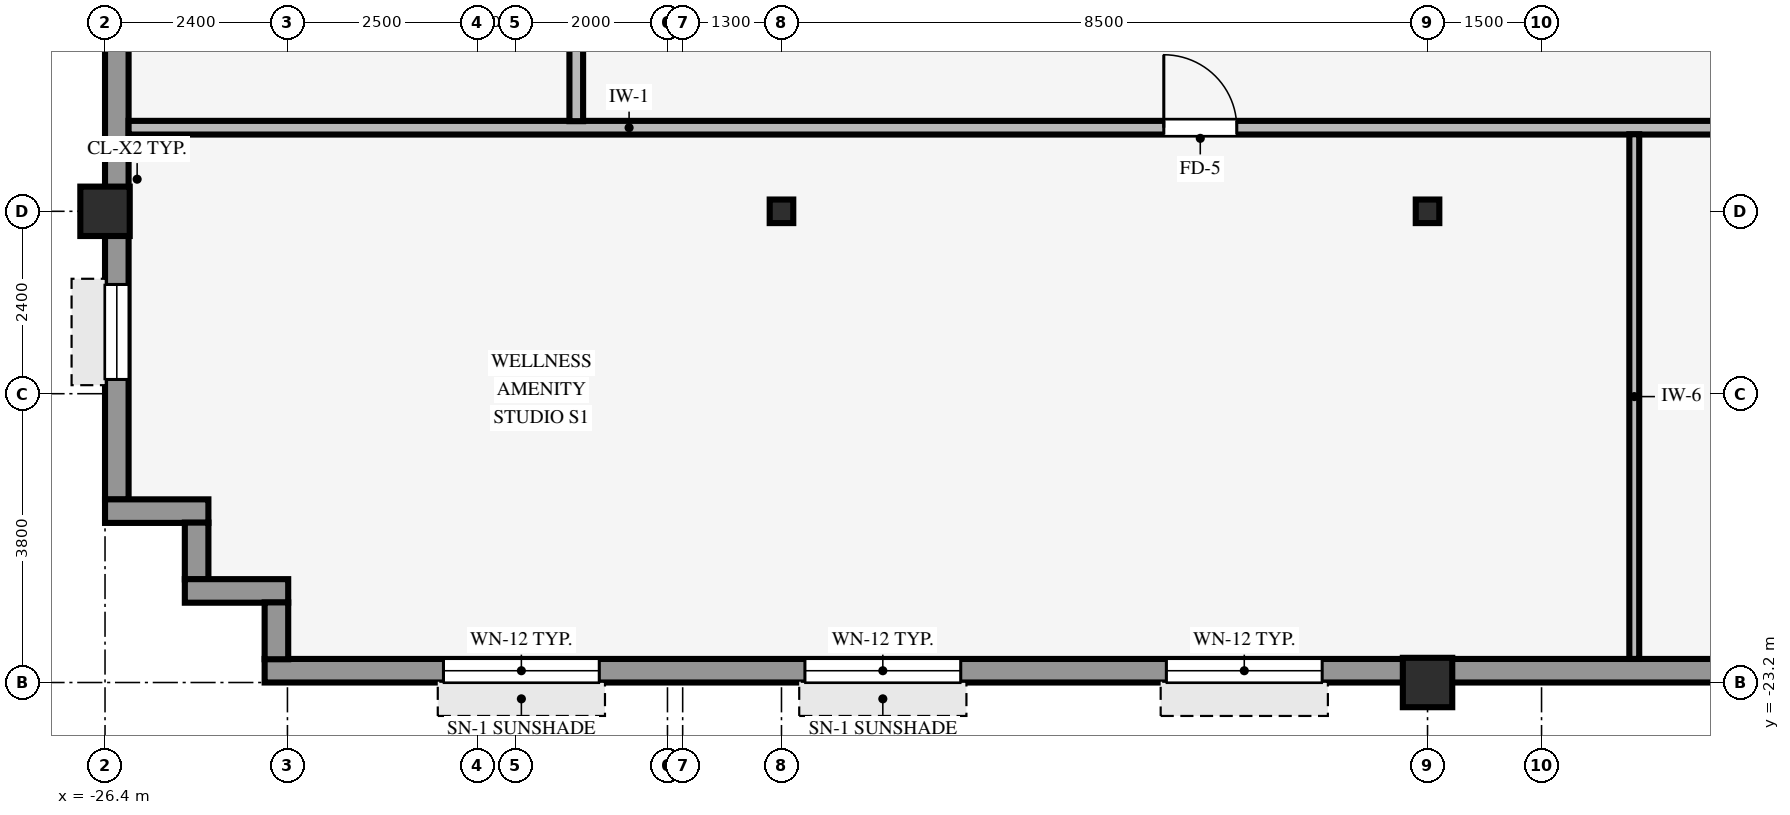
"""IFC4 building model, lengths in metres.
Left out: names, types, materials, properties, quantities, classifications, styles, units other than length and angle.
Written with IfcOpenShell. Run it as: python <this file> out.ifc"""

import sys

from ifc_helpers import new_model, si_unit, direction, frame, frame_2d, origin, origin_2d, place, context, subcontext, project, spatial, rectangle, hollow_rectangle, i_section, extrude, source, transform, mapped, element, fill, save


model = new_model("IFC4")
c1 = context("Model", 3, precision=1e-05, world=origin(), true_north=direction((0.0, 1.0)))
c2 = subcontext(c1, "Body", "Model", "MODEL_VIEW")
j1 = project(units=[si_unit("LENGTHUNIT", "METRE"), si_unit("PLANEANGLEUNIT", "RADIAN")], contexts=[c1])
p1 = place(None, origin())
s1 = spatial("IfcSite", under=j1, at=p1, CompositionType="ELEMENT")
p2 = place(p1, origin())
s2 = spatial("IfcBuilding", under=s1, at=p2, CompositionType="ELEMENT")
p3 = place(p2, frame((0.0, 0.0, 174.95)))
s3 = spatial("IfcBuildingStorey", under=s2, at=p3, CompositionType="ELEMENT", Elevation=174.95)
for number, where, z_axis, x_axis in (
    (1, (-26.4, -17.0, 0.0), (0.0, 0.0, 1.0), (1.0, 0.0, 0.0)),
    (2, (-9.0, -23.2, 0.0), (0.0, 0.0, 1.0), (1.0, 0.0, 0.0)),
):
    element("IfcColumn", number, at=place(p3, frame(where, z_axis=z_axis, x_axis=x_axis)), inside=s3, PredefinedType="COLUMN", context=c2, shape_type="SweptSolid", body=[
        extrude(hollow_rectangle(XDim=0.65, YDim=0.65, WallThickness=0.04, InnerFilletRadius=0.04, OuterFilletRadius=0.08, at=origin_2d()), origin(), (0.0, 0.0, 1.0), 3.37),
    ])
for number, where, z_axis, x_axis in (
    (3, (-17.5, -17.0, 0.0), (0.0, 0.0, 1.0), (1.0, 0.0, 0.0)),
    (4, (-9.0, -17.0, 0.0), (0.0, 0.0, 1.0), (1.0, 0.0, 0.0)),
):
    element("IfcColumn", number, at=place(p3, frame(where, z_axis=z_axis, x_axis=x_axis)), inside=s3, PredefinedType="COLUMN", context=c2, shape_type="SweptSolid", body=[
        extrude(i_section(OverallWidth=0.31, OverallDepth=0.31, WebThickness=0.015, FlangeThickness=0.015, FilletRadius=0.015, at=origin_2d()), origin(), (0.0, 0.0, 1.0), 3.37),
    ])
p4 = place(p3, frame((-24.3, -23.045, 0.0), z_axis=(0.0, 0.0, 1.0), x_axis=(1.0, 0.0, 0.0)))
e5 = element("IfcWall", 5, at=p4, inside=s3, PredefinedType="STANDARD", context=c2, shape_type="SweptSolid", body=[
    extrude(rectangle(XDim=44.8, YDim=0.31, at=frame_2d((22.4, 0.0))), origin(), (0.0, 0.0, 1.0), 2.705),
])
p5 = place(p4, frame((2.353, 0.0, 0.8)))
e6 = element("IfcOpeningElement", 6, at=p5, cuts=e5, PredefinedType="OPENING", context=c2, shape_type="SweptSolid", body=[
    extrude(rectangle(XDim=2.05, YDim=1.52, at=frame_2d((1.025, 0.76))), frame((0.0, 0.165, 0.0), z_axis=(0.0, -1.0, 0.0), x_axis=(1.0, 0.0, 0.0)), (0.0, 0.0, 1.0), 0.33),
])
p6 = place(p4, frame((7.108, 0.0, 0.8)))
e7 = element("IfcOpeningElement", 7, at=p6, cuts=e5, PredefinedType="OPENING", context=c2, shape_type="SweptSolid", body=[
    extrude(rectangle(XDim=2.05, YDim=1.52, at=frame_2d((1.025, 0.76))), frame((0.0, 0.165, 0.0), z_axis=(0.0, -1.0, 0.0), x_axis=(1.0, 0.0, 0.0)), (0.0, 0.0, 1.0), 0.33),
])
p7 = place(p4, frame((11.864, 0.0, 0.8)))
e8 = element("IfcOpeningElement", 8, at=p7, cuts=e5, PredefinedType="OPENING", context=c2, shape_type="SweptSolid", body=[
    extrude(rectangle(XDim=2.05, YDim=1.52, at=frame_2d((1.025, 0.76))), frame((0.0, 0.165, 0.0), z_axis=(0.0, -1.0, 0.0), x_axis=(1.0, 0.0, 0.0)), (0.0, 0.0, 1.0), 0.33),
])
p8 = place(p4, frame((21.375, 0.0, 0.8)))
e9 = element("IfcOpeningElement", 9, at=p8, cuts=e5, PredefinedType="OPENING", context=c2, shape_type="SweptSolid", body=[
    extrude(rectangle(XDim=2.05, YDim=1.52, at=frame_2d((1.025, 0.76))), frame((0.0, 0.165, 0.0), z_axis=(0.0, -1.0, 0.0), x_axis=(1.0, 0.0, 0.0)), (0.0, 0.0, 1.0), 0.33),
])
p9 = place(p4, frame((26.131, 0.0, 0.8)))
e10 = element("IfcOpeningElement", 10, at=p9, cuts=e5, PredefinedType="OPENING", context=c2, shape_type="SweptSolid", body=[
    extrude(rectangle(XDim=2.05, YDim=1.52, at=frame_2d((1.025, 0.76))), frame((0.0, 0.165, 0.0), z_axis=(0.0, -1.0, 0.0), x_axis=(1.0, 0.0, 0.0)), (0.0, 0.0, 1.0), 0.33),
])
p10 = place(p4, frame((29.986, 0.0, 0.8)))
e11 = element("IfcOpeningElement", 11, at=p10, cuts=e5, PredefinedType="OPENING", context=c2, shape_type="SweptSolid", body=[
    extrude(rectangle(XDim=2.05, YDim=1.52, at=frame_2d((1.025, 0.76))), frame((0.0, 0.165, 0.0), z_axis=(0.0, -1.0, 0.0), x_axis=(1.0, 0.0, 0.0)), (0.0, 0.0, 1.0), 0.33),
])
p11 = place(p4, frame((35.642, 0.0, 0.8)))
e12 = element("IfcOpeningElement", 12, at=p11, cuts=e5, PredefinedType="OPENING", context=c2, shape_type="SweptSolid", body=[
    extrude(rectangle(XDim=2.05, YDim=1.52, at=frame_2d((1.025, 0.76))), frame((0.0, 0.165, 0.0), z_axis=(0.0, -1.0, 0.0), x_axis=(1.0, 0.0, 0.0)), (0.0, 0.0, 1.0), 0.33),
])
p12 = place(p4, frame((40.397, 0.0, 0.8)))
e13 = element("IfcOpeningElement", 13, at=p12, cuts=e5, PredefinedType="OPENING", context=c2, shape_type="SweptSolid", body=[
    extrude(rectangle(XDim=2.05, YDim=1.52, at=frame_2d((1.025, 0.76))), frame((0.0, 0.165, 0.0), z_axis=(0.0, -1.0, 0.0), x_axis=(1.0, 0.0, 0.0)), (0.0, 0.0, 1.0), 0.33),
])
p13 = place(p3, frame((-26.245, -20.794, 0.0), z_axis=(0.0, 0.0, 1.0), x_axis=(0.0, 1.0, 0.0)))
e14 = element("IfcWall", 14, at=p13, inside=s3, PredefinedType="STANDARD", context=c2, shape_type="SweptSolid", body=[
    extrude(rectangle(XDim=37.788, YDim=0.31, at=frame_2d((18.894, 0.0))), origin(), (0.0, 0.0, 1.0), 2.705),
])
p14 = place(p13, frame((24.994, 0.0, 0.0)))
e15 = element("IfcOpeningElement", 15, at=p14, cuts=e14, PredefinedType="OPENING", context=c2, shape_type="SweptSolid", body=[
    extrude(rectangle(XDim=1.05, YDim=2.1, at=frame_2d((0.525, 1.05))), frame((0.0, 0.165, 0.0), z_axis=(0.0, -1.0, 0.0), x_axis=(1.0, 0.0, 0.0)), (0.0, 0.0, 1.0), 0.33),
])
p15 = place(p13, frame((1.581, 0.0, 0.8)))
e16 = element("IfcOpeningElement", 16, at=p15, cuts=e14, PredefinedType="OPENING", context=c2, shape_type="SweptSolid", body=[
    extrude(rectangle(XDim=1.25, YDim=1.52, at=frame_2d((0.625, 0.76))), frame((0.0, 0.165, 0.0), z_axis=(0.0, -1.0, 0.0), x_axis=(1.0, 0.0, 0.0)), (0.0, 0.0, 1.0), 0.33),
])
p16 = place(p13, frame((8.044, 0.0, 0.8)))
e17 = element("IfcOpeningElement", 17, at=p16, cuts=e14, PredefinedType="OPENING", context=c2, shape_type="SweptSolid", body=[
    extrude(rectangle(XDim=1.25, YDim=1.52, at=frame_2d((0.625, 0.76))), frame((0.0, 0.165, 0.0), z_axis=(0.0, -1.0, 0.0), x_axis=(1.0, 0.0, 0.0)), (0.0, 0.0, 1.0), 0.33),
])
p17 = place(p13, frame((13.156, 0.0, 0.8)))
e18 = element("IfcOpeningElement", 18, at=p17, cuts=e14, PredefinedType="OPENING", context=c2, shape_type="SweptSolid", body=[
    extrude(rectangle(XDim=1.25, YDim=1.52, at=frame_2d((0.625, 0.76))), frame((0.0, 0.165, 0.0), z_axis=(0.0, -1.0, 0.0), x_axis=(1.0, 0.0, 0.0)), (0.0, 0.0, 1.0), 0.33),
])
p18 = place(p13, frame((18.269, 0.0, 0.8)))
e19 = element("IfcOpeningElement", 19, at=p18, cuts=e14, PredefinedType="OPENING", context=c2, shape_type="SweptSolid", body=[
    extrude(rectangle(XDim=1.25, YDim=1.52, at=frame_2d((0.625, 0.76))), frame((0.0, 0.165, 0.0), z_axis=(0.0, -1.0, 0.0), x_axis=(1.0, 0.0, 0.0)), (0.0, 0.0, 1.0), 0.33),
])
p19 = place(p13, frame((23.382, 0.0, 0.8)))
e20 = element("IfcOpeningElement", 20, at=p19, cuts=e14, PredefinedType="OPENING", context=c2, shape_type="SweptSolid", body=[
    extrude(rectangle(XDim=1.25, YDim=1.52, at=frame_2d((0.625, 0.76))), frame((0.0, 0.165, 0.0), z_axis=(0.0, -1.0, 0.0), x_axis=(1.0, 0.0, 0.0)), (0.0, 0.0, 1.0), 0.33),
])
p20 = place(p13, frame((28.044, 0.0, 0.8)))
e21 = element("IfcOpeningElement", 21, at=p20, cuts=e14, PredefinedType="OPENING", context=c2, shape_type="SweptSolid", body=[
    extrude(rectangle(XDim=1.25, YDim=1.52, at=frame_2d((0.625, 0.76))), frame((0.0, 0.165, 0.0), z_axis=(0.0, -1.0, 0.0), x_axis=(1.0, 0.0, 0.0)), (0.0, 0.0, 1.0), 0.33),
])
p21 = place(p13, frame((33.607, 0.0, 0.8)))
e22 = element("IfcOpeningElement", 22, at=p21, cuts=e14, PredefinedType="OPENING", context=c2, shape_type="SweptSolid", body=[
    extrude(rectangle(XDim=1.25, YDim=1.52, at=frame_2d((0.625, 0.76))), frame((0.0, 0.165, 0.0), z_axis=(0.0, -1.0, 0.0), x_axis=(1.0, 0.0, 0.0)), (0.0, 0.0, 1.0), 0.33),
])
p22 = place(p3, frame((-26.4, -20.945, 0.0), z_axis=(0.0, 0.0, 1.0), x_axis=(1.0, 0.0, 0.0)))
e23 = element("IfcWall", 23, at=p22, inside=s3, PredefinedType="STANDARD", context=c2, shape_type="SweptSolid", body=[
    extrude(rectangle(XDim=1.36, YDim=0.31, at=frame_2d((0.68, 0.0))), origin(), (0.0, 0.0, 1.0), 3.36),
])
p23 = place(p3, frame((-25.195, -21.844, 0.0), z_axis=(0.0, 0.0, 1.0), x_axis=(0.0, 1.0, 0.0)))
e24 = element("IfcWall", 24, at=p23, inside=s3, PredefinedType="STANDARD", context=c2, shape_type="SweptSolid", body=[
    extrude(rectangle(XDim=0.748, YDim=0.31, at=frame_2d((0.374, 0.0))), origin(), (0.0, 0.0, 1.0), 3.36),
])
p24 = place(p3, frame((-25.35, -21.995, 0.0), z_axis=(0.0, 0.0, 1.0), x_axis=(1.0, 0.0, 0.0)))
e25 = element("IfcWall", 25, at=p24, inside=s3, PredefinedType="STANDARD", context=c2, shape_type="SweptSolid", body=[
    extrude(rectangle(XDim=1.36, YDim=0.31, at=frame_2d((0.68, 0.0))), origin(), (0.0, 0.0, 1.0), 3.36),
])
p25 = place(p3, frame((-24.145, -22.894, 0.0), z_axis=(0.0, 0.0, 1.0), x_axis=(0.0, 1.0, 0.0)))
e26 = element("IfcWall", 26, at=p25, inside=s3, PredefinedType="STANDARD", context=c2, shape_type="SweptSolid", body=[
    extrude(rectangle(XDim=0.748, YDim=0.31, at=frame_2d((0.374, 0.0))), origin(), (0.0, 0.0, 1.0), 3.36),
])
p26 = place(p3, frame((-26.09, -15.9, 0.0), z_axis=(0.0, 0.0, 1.0), x_axis=(1.0, 0.0, 0.0)))
e27 = element("IfcWall", 27, at=p26, inside=s3, PredefinedType="PARTITIONING", context=c2, shape_type="SweptSolid", body=[
    extrude(rectangle(XDim=48.38, YDim=0.18, at=frame_2d((24.19, 0.0))), origin(), (0.0, 0.0, 1.0), 3.36),
])
p27 = place(p26, frame((26.51, 0.0, 0.0)))
e28 = element("IfcOpeningElement", 28, at=p27, cuts=e27, PredefinedType="OPENING", context=c2, shape_type="SweptSolid", body=[
    extrude(rectangle(XDim=0.96, YDim=2.1, at=frame_2d((0.48, 1.05))), frame((0.0, 0.1, 0.0), z_axis=(0.0, -1.0, 0.0), x_axis=(1.0, 0.0, 0.0)), (0.0, 0.0, 1.0), 0.2),
])
p28 = place(p26, frame((40.51, 0.0, 0.0)))
e29 = element("IfcOpeningElement", 29, at=p28, cuts=e27, PredefinedType="OPENING", context=c2, shape_type="SweptSolid", body=[
    extrude(rectangle(XDim=0.96, YDim=2.1, at=frame_2d((0.48, 1.05))), frame((0.0, 0.1, 0.0), z_axis=(0.0, -1.0, 0.0), x_axis=(1.0, 0.0, 0.0)), (0.0, 0.0, 1.0), 0.2),
])
p29 = place(p26, frame((13.62, 0.0, 0.0)))
e30 = element("IfcOpeningElement", 30, at=p29, cuts=e27, PredefinedType="OPENING", context=c2, shape_type="SweptSolid", body=[
    extrude(rectangle(XDim=0.96, YDim=2.1, at=frame_2d((0.48, 1.05))), frame((0.0, 0.1, 0.0), z_axis=(0.0, -1.0, 0.0), x_axis=(1.0, 0.0, 0.0)), (0.0, 0.0, 1.0), 0.2),
])
p30 = place(p3, frame((-20.2, -15.814, 0.0), z_axis=(0.0, 0.0, 1.0), x_axis=(0.0, 1.0, 0.0)))
e31 = element("IfcWall", 31, at=p30, inside=s3, PredefinedType="PARTITIONING", context=c2, shape_type="SweptSolid", body=[
    extrude(rectangle(XDim=31.628, YDim=0.18, at=frame_2d((15.814, 0.0))), origin(), (0.0, 0.0, 1.0), 3.36),
])
p31 = place(p30, frame((20.334, 0.0, 0.0)))
e32 = element("IfcOpeningElement", 32, at=p31, cuts=e31, PredefinedType="OPENING", context=c2, shape_type="SweptSolid", body=[
    extrude(rectangle(XDim=0.96, YDim=2.1, at=frame_2d((0.48, 1.05))), frame((0.0, 0.1, 0.0), z_axis=(0.0, -1.0, 0.0), x_axis=(1.0, 0.0, 0.0)), (0.0, 0.0, 1.0), 0.2),
])
p32 = place(p30, frame((6.834, 0.0, 0.0)))
e33 = element("IfcOpeningElement", 33, at=p32, cuts=e31, PredefinedType="OPENING", context=c2, shape_type="SweptSolid", body=[
    extrude(rectangle(XDim=0.96, YDim=2.1, at=frame_2d((0.48, 1.05))), frame((0.0, 0.1, 0.0), z_axis=(0.0, -1.0, 0.0), x_axis=(1.0, 0.0, 0.0)), (0.0, 0.0, 1.0), 0.2),
])
p33 = place(p3, frame((-6.28, -22.89, 0.0), z_axis=(0.0, 0.0, 1.0), x_axis=(0.0, 1.0, 0.0)))
e34 = element("IfcWall", 34, at=p33, inside=s3, PredefinedType="PARTITIONING", context=c2, shape_type="SweptSolid", body=[
    extrude(rectangle(XDim=6.904, YDim=0.13, at=frame_2d((3.452, 0.0))), origin(), (0.0, 0.0, 1.0), 3.36),
])
m1 = source(origin(), c2, "Body", "SweptSolid", [
    extrude(rectangle(XDim=2.05, YDim=1.52, at=frame_2d((1.025, 0.76))), frame((0.0, 0.03, 0.0), z_axis=(0.0, -1.0, 0.0), x_axis=(1.0, 0.0, 0.0)), (0.0, 0.0, 1.0), 0.06),
])
p34 = place(p5, origin())
e35 = element("IfcWindow", 35, at=p34, inside=s3, PartitioningType="SINGLE_PANEL", PredefinedType="WINDOW", context=c2, shape_type="MappedRepresentation", body=[
    mapped(m1, transform((0.0, 0.0, 0.0), scale=1.0)),
])
fill(e6, e35)
p35 = place(p6, origin())
e36 = element("IfcWindow", 36, at=p35, inside=s3, PartitioningType="SINGLE_PANEL", PredefinedType="WINDOW", context=c2, shape_type="MappedRepresentation", body=[
    mapped(m1, transform((0.0, 0.0, 0.0), scale=1.0)),
])
fill(e7, e36)
p36 = place(p7, origin())
e37 = element("IfcWindow", 37, at=p36, inside=s3, PartitioningType="SINGLE_PANEL", PredefinedType="WINDOW", context=c2, shape_type="MappedRepresentation", body=[
    mapped(m1, transform((0.0, 0.0, 0.0), scale=1.0)),
])
fill(e8, e37)
m2 = source(origin(), c2, "Body", "SweptSolid", [
    extrude(rectangle(XDim=1.25, YDim=1.52, at=frame_2d((0.625, 0.76))), frame((0.0, 0.03, 0.0), z_axis=(0.0, -1.0, 0.0), x_axis=(1.0, 0.0, 0.0)), (0.0, 0.0, 1.0), 0.06),
])
p37 = place(p15, origin())
e38 = element("IfcWindow", 38, at=p37, inside=s3, PartitioningType="SINGLE_PANEL", PredefinedType="WINDOW", context=c2, shape_type="MappedRepresentation", body=[
    mapped(m2, transform((0.0, 0.0, 0.0), scale=1.0)),
])
fill(e16, e38)
m3 = source(origin(), c2, "Body", "SweptSolid", [
    extrude(rectangle(XDim=0.96, YDim=2.1, at=frame_2d((0.48, 1.05))), frame((0.0, 0.025, 0.0), z_axis=(0.0, -1.0, 0.0), x_axis=(1.0, 0.0, 0.0)), (0.0, 0.0, 1.0), 0.05),
])
p38 = place(p29, origin())
e39 = element("IfcDoor", 39, at=p38, inside=s3, OperationType="SINGLE_SWING_LEFT", PredefinedType="DOOR", context=c2, shape_type="MappedRepresentation", body=[
    mapped(m3, transform((0.0, 0.0, 0.0), scale=1.0)),
])
fill(e30, e39)
save(model, sys.argv[1])
